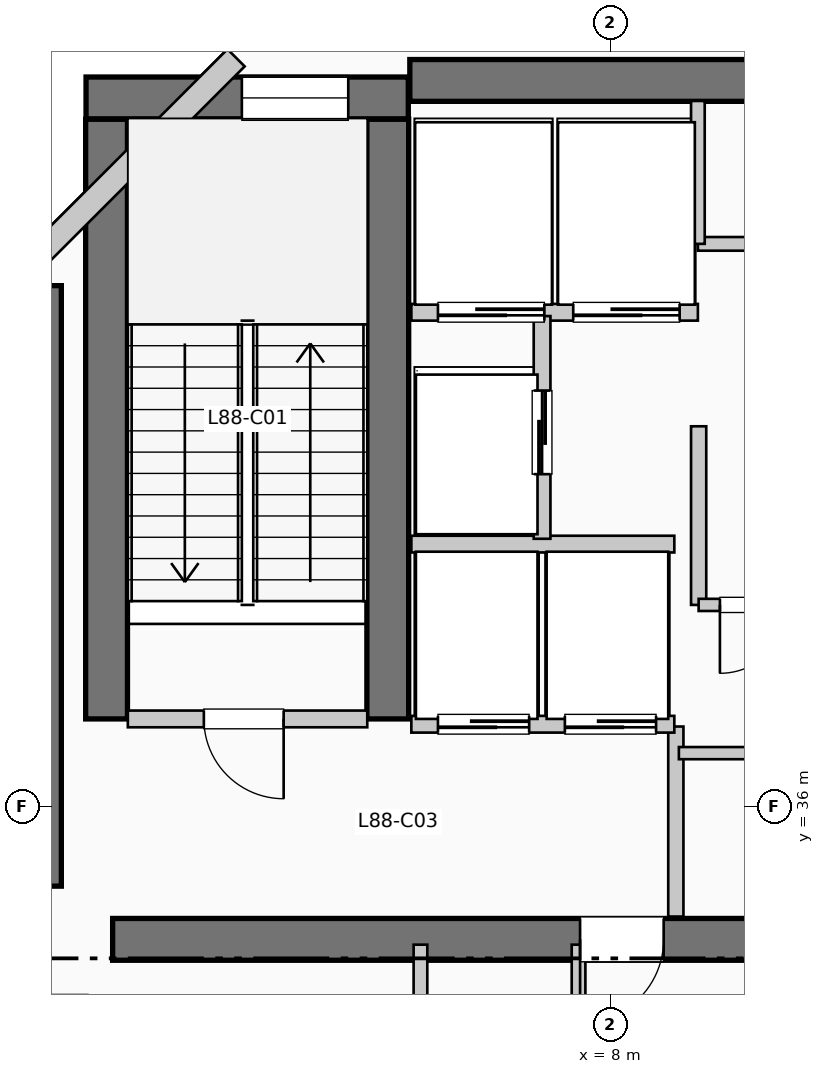
"""IFC4 building model, lengths in metres.
Left out: names, types, materials, properties, quantities, classifications, styles, units other than length and angle.
Written with IfcOpenShell. Run it as: python <this file> out.ifc"""

import sys

from ifc_helpers import new_model, si_unit, direction, frame, frame_2d, origin, place, context, subcontext, project, spatial, rectangle, extrude, element, fill, save


model = new_model("IFC4")
c1 = context("Model", 3, precision=1e-05, world=origin(), true_north=direction((0.0, 1.0)))
c2 = subcontext(c1, "Body", "Model", "MODEL_VIEW")
j1 = project(units=[si_unit("LENGTHUNIT", "METRE"), si_unit("PLANEANGLEUNIT", "RADIAN")], contexts=[c1])
p1 = place(None, origin())
s1 = spatial("IfcSite", under=j1, at=p1, CompositionType="ELEMENT")
p2 = place(p1, origin())
s2 = spatial("IfcBuilding", under=s1, at=p2, CompositionType="ELEMENT")
p3 = place(p2, frame((0.0, 0.0, 361.35)))
s3 = spatial("IfcBuildingStorey", under=s2, at=p3, CompositionType="ELEMENT", Elevation=361.35)
p4 = place(p3, frame((5.36, 45.55, 0.0), z_axis=(0.0, 0.0, 1.0), x_axis=(1.0, 0.0, 0.0)))
e1 = element("IfcWall", 1, at=p4, inside=s3, PredefinedType="SHEAR", context=c2, shape_type="SweptSolid", body=[
    extrude(rectangle(XDim=13.98, YDim=0.55, at=frame_2d((6.99, 0.0))), origin(), (0.0, 0.0, 1.0), 4.62),
])
p5 = place(p3, frame((0.5, 34.95, 0.0), z_axis=(0.0, 0.0, 1.0), x_axis=(0.0, 1.0, 0.0)))
e2 = element("IfcWall", 2, at=p5, inside=s3, PredefinedType="SHEAR", context=c2, shape_type="SweptSolid", body=[
    extrude(rectangle(XDim=7.9, YDim=0.55, at=frame_2d((3.95, 0.0))), origin(), (0.0, 0.0, 1.0), 4.62),
])
p6 = place(p3, frame((1.45, 34.25, 0.0), z_axis=(0.0, 0.0, 1.0), x_axis=(1.0, 0.0, 0.0)))
e3 = element("IfcWall", 3, at=p6, inside=s3, PredefinedType="SHEAR", context=c2, shape_type="SweptSolid", body=[
    extrude(rectangle(XDim=10.71, YDim=0.55, at=frame_2d((5.355, 0.0))), origin(), (0.0, 0.0, 1.0), 4.62),
])
p7 = place(p6, frame((7.25, 0.0, 0.0), z_axis=(0.0, 0.0, 1.0), x_axis=(-1.0, 0.0, 0.0)))
e4 = element("IfcOpeningElement", 4, at=p7, cuts=e3, PredefinedType="OPENING", context=c2, shape_type="SweptSolid", body=[
    extrude(rectangle(XDim=1.1, YDim=2.15, at=frame_2d((0.55, 1.075))), frame((0.0, 0.285, 0.0), z_axis=(0.0, -1.0, 0.0), x_axis=(1.0, 0.0, 0.0)), (0.0, 0.0, 1.0), 0.57),
])
for number, where, z_axis, x_axis in (
    (5, (1.37, 37.15, 0.0), (0.0, 0.0, 1.0), (0.0, 1.0, 0.0)),
    (6, (5.07, 37.15, 0.0), (0.0, 0.0, 1.0), (0.0, 1.0, 0.0)),
):
    element("IfcWall", number, at=place(p3, frame(where, z_axis=z_axis, x_axis=x_axis)), inside=s3, PredefinedType="SHEAR", context=c2, shape_type="SweptSolid", body=[
        extrude(rectangle(XDim=7.89, YDim=0.55, at=frame_2d((3.945, 0.0))), origin(), (0.0, 0.0, 1.0), 4.62),
    ])
p8 = place(p3, frame((1.1, 45.32, 0.0), z_axis=(0.0, 0.0, 1.0), x_axis=(1.0, 0.0, 0.0)))
e7 = element("IfcWall", 7, at=p8, inside=s3, PredefinedType="SHEAR", context=c2, shape_type="SweptSolid", body=[
    extrude(rectangle(XDim=4.24, YDim=0.55, at=frame_2d((2.12, 0.0))), origin(), (0.0, 0.0, 1.0), 4.62),
])
p9 = place(p8, frame((2.05, 0.0, 1.05)))
e8 = element("IfcOpeningElement", 8, at=p9, cuts=e7, PredefinedType="OPENING", context=c2, shape_type="SweptSolid", body=[
    extrude(rectangle(XDim=1.4, YDim=1.8, at=frame_2d((0.7, 0.9))), frame((0.0, 0.285, 0.0), z_axis=(0.0, -1.0, 0.0), x_axis=(1.0, 0.0, 0.0)), (0.0, 0.0, 1.0), 0.57),
])
p10 = place(p3, frame((3.074, 45.848, 0.0), z_axis=(0.0, 0.0, 1.0), x_axis=(-0.707106781187, -0.707106781187, 0.0)))
e9 = element("IfcWall", 9, at=p10, inside=s3, PredefinedType="SOLIDWALL", context=c2, shape_type="SweptSolid", body=[
    extrude(rectangle(XDim=4.133, YDim=0.32, at=frame_2d((2.066, 0.0))), origin(), (0.0, 0.0, 1.0), 4.27),
])
p11 = place(p3, frame((1.65, 37.15, 0.0), z_axis=(0.0, 0.0, 1.0), x_axis=(1.0, 0.0, 0.0)))
e10 = element("IfcWall", 10, at=p11, inside=s3, PredefinedType="PARTITIONING", context=c2, shape_type="SweptSolid", body=[
    extrude(rectangle(XDim=3.15, YDim=0.22, at=frame_2d((1.575, 0.0))), origin(), (0.0, 0.0, 1.0), 4.27),
])
p12 = place(p11, frame((2.05, 0.0, 0.0), z_axis=(0.0, 0.0, 1.0), x_axis=(-1.0, 0.0, 0.0)))
e11 = element("IfcOpeningElement", 11, at=p12, cuts=e10, PredefinedType="OPENING", context=c2, shape_type="SweptSolid", body=[
    extrude(rectangle(XDim=1.05, YDim=2.15, at=frame_2d((0.525, 1.075))), frame((0.0, 0.12, 0.0), z_axis=(0.0, -1.0, 0.0), x_axis=(1.0, 0.0, 0.0)), (0.0, 0.0, 1.0), 0.24),
])
p13 = place(p3, frame((8.86, 34.55, 0.0), z_axis=(0.0, 0.0, 1.0), x_axis=(0.0, 1.0, 0.0)))
e12 = element("IfcWall", 12, at=p13, inside=s3, PredefinedType="PARTITIONING", context=c2, shape_type="SweptSolid", body=[
    extrude(rectangle(XDim=2.5, YDim=0.2, at=frame_2d((1.25, 0.0))), origin(), (0.0, 0.0, 1.0), 4.27),
])
p14 = place(p3, frame((5.38, 37.08, 0.0), z_axis=(0.0, 0.0, 1.0), x_axis=(1.0, 0.0, 0.0)))
e13 = element("IfcWall", 13, at=p14, inside=s3, PredefinedType="PARTITIONING", context=c2, shape_type="SweptSolid", body=[
    extrude(rectangle(XDim=3.46, YDim=0.22, at=frame_2d((1.73, 0.0))), origin(), (0.0, 0.0, 1.0), 4.27),
])
p15 = place(p14, frame((1.55, 0.0, 0.0), z_axis=(0.0, 0.0, 1.0), x_axis=(-1.0, 0.0, 0.0)))
e14 = element("IfcOpeningElement", 14, at=p15, cuts=e13, PredefinedType="OPENING", context=c2, shape_type="SweptSolid", body=[
    extrude(rectangle(XDim=1.2, YDim=2.2, at=frame_2d((0.6, 1.1))), frame((0.0, 0.12, 0.0), z_axis=(0.0, -1.0, 0.0), x_axis=(1.0, 0.0, 0.0)), (0.0, 0.0, 1.0), 0.24),
])
p16 = place(p14, frame((3.22, 0.0, 0.0), z_axis=(0.0, 0.0, 1.0), x_axis=(-1.0, 0.0, 0.0)))
e15 = element("IfcOpeningElement", 15, at=p16, cuts=e13, PredefinedType="OPENING", context=c2, shape_type="SweptSolid", body=[
    extrude(rectangle(XDim=1.2, YDim=2.2, at=frame_2d((0.6, 1.1))), frame((0.0, 0.12, 0.0), z_axis=(0.0, -1.0, 0.0), x_axis=(1.0, 0.0, 0.0)), (0.0, 0.0, 1.0), 0.24),
])
p17 = place(p3, frame((5.38, 39.45, 0.0), z_axis=(0.0, 0.0, 1.0), x_axis=(1.0, 0.0, 0.0)))
e16 = element("IfcWall", 16, at=p17, inside=s3, PredefinedType="PARTITIONING", context=c2, shape_type="SweptSolid", body=[
    extrude(rectangle(XDim=3.46, YDim=0.22, at=frame_2d((1.73, 0.0))), origin(), (0.0, 0.0, 1.0), 4.27),
])
p18 = place(p3, frame((5.38, 42.5, 0.0), z_axis=(0.0, 0.0, 1.0), x_axis=(1.0, 0.0, 0.0)))
e17 = element("IfcWall", 17, at=p18, inside=s3, PredefinedType="PARTITIONING", context=c2, shape_type="SweptSolid", body=[
    extrude(rectangle(XDim=3.77, YDim=0.22, at=frame_2d((1.885, 0.0))), origin(), (0.0, 0.0, 1.0), 4.27),
])
p19 = place(p18, frame((1.75, 0.0, 0.0), z_axis=(0.0, 0.0, 1.0), x_axis=(-1.0, 0.0, 0.0)))
e18 = element("IfcOpeningElement", 18, at=p19, cuts=e17, PredefinedType="OPENING", context=c2, shape_type="SweptSolid", body=[
    extrude(rectangle(XDim=1.4, YDim=2.2, at=frame_2d((0.7, 1.1))), frame((0.0, 0.12, 0.0), z_axis=(0.0, -1.0, 0.0), x_axis=(1.0, 0.0, 0.0)), (0.0, 0.0, 1.0), 0.24),
])
p20 = place(p18, frame((3.53, 0.0, 0.0), z_axis=(0.0, 0.0, 1.0), x_axis=(-1.0, 0.0, 0.0)))
e19 = element("IfcOpeningElement", 19, at=p20, cuts=e17, PredefinedType="OPENING", context=c2, shape_type="SweptSolid", body=[
    extrude(rectangle(XDim=1.4, YDim=2.2, at=frame_2d((0.7, 1.1))), frame((0.0, 0.12, 0.0), z_axis=(0.0, -1.0, 0.0), x_axis=(1.0, 0.0, 0.0)), (0.0, 0.0, 1.0), 0.24),
])
p21 = place(p3, frame((7.1, 39.52, 0.0), z_axis=(0.0, 0.0, 1.0), x_axis=(0.0, 1.0, 0.0)))
e20 = element("IfcWall", 20, at=p21, inside=s3, PredefinedType="PARTITIONING", context=c2, shape_type="SweptSolid", body=[
    extrude(rectangle(XDim=2.93, YDim=0.22, at=frame_2d((1.465, 0.0))), origin(), (0.0, 0.0, 1.0), 4.27),
])
p22 = place(p21, frame((0.85, 0.0, 0.0)))
e21 = element("IfcOpeningElement", 21, at=p22, cuts=e20, PredefinedType="OPENING", context=c2, shape_type="SweptSolid", body=[
    extrude(rectangle(XDim=1.1, YDim=2.2, at=frame_2d((0.55, 1.1))), frame((0.0, 0.12, 0.0), z_axis=(0.0, -1.0, 0.0), x_axis=(1.0, 0.0, 0.0)), (0.0, 0.0, 1.0), 0.24),
])
p23 = place(p3, frame((9.16, 38.65, 0.0), z_axis=(0.0, 0.0, 1.0), x_axis=(0.0, 1.0, 0.0)))
e22 = element("IfcWall", 22, at=p23, inside=s3, PredefinedType="PARTITIONING", context=c2, shape_type="SweptSolid", body=[
    extrude(rectangle(XDim=2.35, YDim=0.2, at=frame_2d((1.175, 0.0))), origin(), (0.0, 0.0, 1.0), 4.27),
])
for number, where, z_axis, x_axis in (
    (23, (7.58, 31.82, 0.0), (0.0, 0.0, 1.0), (0.0, 1.0, 0.0)),
    (24, (5.5, 31.82, 0.0), (0.0, 0.0, 1.0), (0.0, 1.0, 0.0)),
):
    element("IfcWall", number, at=place(p3, frame(where, z_axis=z_axis, x_axis=x_axis)), inside=s3, PredefinedType="PLUMBINGWALL", context=c2, shape_type="SweptSolid", body=[
        extrude(rectangle(XDim=2.36, YDim=0.18, at=frame_2d((1.18, 0.0))), origin(), (0.0, 0.0, 1.0), 4.27),
    ])
p24 = place(p3, frame((8.9, 36.7, 0.0), z_axis=(0.0, 0.0, 1.0), x_axis=(1.0, 0.0, 0.0)))
e25 = element("IfcWall", 25, at=p24, inside=s3, PredefinedType="PARTITIONING", context=c2, shape_type="SweptSolid", body=[
    extrude(rectangle(XDim=3.25, YDim=0.16, at=frame_2d((1.625, 0.0))), origin(), (0.0, 0.0, 1.0), 4.27),
])
p25 = place(p24, frame((1.1, 0.0, 0.0)))
e26 = element("IfcOpeningElement", 26, at=p25, cuts=e25, PredefinedType="OPENING", context=c2, shape_type="SweptSolid", body=[
    extrude(rectangle(XDim=0.95, YDim=2.15, at=frame_2d((0.475, 1.075))), frame((0.0, 0.09, 0.0), z_axis=(0.0, -1.0, 0.0), x_axis=(1.0, 0.0, 0.0)), (0.0, 0.0, 1.0), 0.18),
])
p26 = place(p3, frame((9.16, 38.65, 0.0), z_axis=(0.0, 0.0, 1.0), x_axis=(1.0, 0.0, 0.0)))
e27 = element("IfcWall", 27, at=p26, inside=s3, PredefinedType="PARTITIONING", context=c2, shape_type="SweptSolid", body=[
    extrude(rectangle(XDim=3.42, YDim=0.16, at=frame_2d((1.71, 0.0))), origin(), (0.0, 0.0, 1.0), 4.27),
])
p27 = place(p26, frame((1.18, 0.0, 0.0), z_axis=(0.0, 0.0, 1.0), x_axis=(-1.0, 0.0, 0.0)))
e28 = element("IfcOpeningElement", 28, at=p27, cuts=e27, PredefinedType="OPENING", context=c2, shape_type="SweptSolid", body=[
    extrude(rectangle(XDim=0.9, YDim=2.15, at=frame_2d((0.45, 1.075))), frame((0.0, 0.09, 0.0), z_axis=(0.0, -1.0, 0.0), x_axis=(1.0, 0.0, 0.0)), (0.0, 0.0, 1.0), 0.18),
])
p28 = place(p26, frame((2.6, 0.0, 0.0), z_axis=(0.0, 0.0, 1.0), x_axis=(-1.0, 0.0, 0.0)))
e29 = element("IfcOpeningElement", 29, at=p28, cuts=e27, PredefinedType="OPENING", context=c2, shape_type="SweptSolid", body=[
    extrude(rectangle(XDim=0.9, YDim=2.15, at=frame_2d((0.45, 1.075))), frame((0.0, 0.09, 0.0), z_axis=(0.0, -1.0, 0.0), x_axis=(1.0, 0.0, 0.0)), (0.0, 0.0, 1.0), 0.18),
])
p29 = place(p3, frame((9.15, 43.4, 0.0), z_axis=(0.0, 0.0, 1.0), x_axis=(1.0, 0.0, 0.0)))
e30 = element("IfcWall", 30, at=p29, inside=s3, PredefinedType="PLUMBINGWALL", context=c2, shape_type="SweptSolid", body=[
    extrude(rectangle(XDim=9.33, YDim=0.18, at=frame_2d((4.665, 0.0))), origin(), (0.0, 0.0, 1.0), 4.27),
])
p30 = place(p29, frame((0.72, 0.0, 0.0)))
e31 = element("IfcOpeningElement", 31, at=p30, cuts=e30, PredefinedType="OPENING", context=c2, shape_type="SweptSolid", body=[
    extrude(rectangle(XDim=0.92, YDim=2.1, at=frame_2d((0.46, 1.05))), frame((0.0, 0.1, 0.0), z_axis=(0.0, -1.0, 0.0), x_axis=(1.0, 0.0, 0.0)), (0.0, 0.0, 1.0), 0.2),
])
p31 = place(p29, frame((3.02, 0.0, 0.0)))
e32 = element("IfcOpeningElement", 32, at=p31, cuts=e30, PredefinedType="OPENING", context=c2, shape_type="SweptSolid", body=[
    extrude(rectangle(XDim=0.92, YDim=2.1, at=frame_2d((0.46, 1.05))), frame((0.0, 0.1, 0.0), z_axis=(0.0, -1.0, 0.0), x_axis=(1.0, 0.0, 0.0)), (0.0, 0.0, 1.0), 0.2),
])
p32 = place(p29, frame((5.34, 0.0, 0.0)))
e33 = element("IfcOpeningElement", 33, at=p32, cuts=e30, PredefinedType="OPENING", context=c2, shape_type="SweptSolid", body=[
    extrude(rectangle(XDim=0.92, YDim=2.1, at=frame_2d((0.46, 1.05))), frame((0.0, 0.1, 0.0), z_axis=(0.0, -1.0, 0.0), x_axis=(1.0, 0.0, 0.0)), (0.0, 0.0, 1.0), 0.2),
])
p33 = place(p29, frame((7.66, 0.0, 0.0)))
e34 = element("IfcOpeningElement", 34, at=p33, cuts=e30, PredefinedType="OPENING", context=c2, shape_type="SweptSolid", body=[
    extrude(rectangle(XDim=0.95, YDim=2.1, at=frame_2d((0.475, 1.05))), frame((0.0, 0.1, 0.0), z_axis=(0.0, -1.0, 0.0), x_axis=(1.0, 0.0, 0.0)), (0.0, 0.0, 1.0), 0.2),
])
p34 = place(p3, frame((9.15, 43.4, 0.0), z_axis=(0.0, 0.0, 1.0), x_axis=(0.0, 1.0, 0.0)))
e35 = element("IfcWall", 35, at=p34, inside=s3, PredefinedType="PLUMBINGWALL", context=c2, shape_type="SweptSolid", body=[
    extrude(rectangle(XDim=1.88, YDim=0.18, at=frame_2d((0.94, 0.0))), origin(), (0.0, 0.0, 1.0), 4.27),
])
p35 = place(p9, origin())
e36 = element("IfcWindow", 36, at=p35, inside=s3, PartitioningType="SINGLE_PANEL", PredefinedType="WINDOW", context=c2, shape_type="SweptSolid", body=[
    extrude(rectangle(XDim=1.4, YDim=1.8, at=frame_2d((0.7, 0.9))), frame((0.0, 0.03, 0.0), z_axis=(0.0, -1.0, 0.0), x_axis=(1.0, 0.0, 0.0)), (0.0, 0.0, 1.0), 0.06),
])
fill(e8, e36)
p36 = place(p12, origin())
e37 = element("IfcDoor", 37, at=p36, inside=s3, OperationType="SINGLE_SWING_RIGHT", PredefinedType="DOOR", context=c2, shape_type="SweptSolid", body=[
    extrude(rectangle(XDim=1.05, YDim=2.15, at=frame_2d((0.525, 1.075))), frame((0.0, 0.025, 0.0), z_axis=(0.0, -1.0, 0.0), x_axis=(1.0, 0.0, 0.0)), (0.0, 0.0, 1.0), 0.05),
])
fill(e11, e37)
p37 = place(p7, origin())
e38 = element("IfcDoor", 38, at=p37, inside=s3, OperationType="SINGLE_SWING_LEFT", PredefinedType="DOOR", context=c2, shape_type="SweptSolid", body=[
    extrude(rectangle(XDim=1.1, YDim=2.15, at=frame_2d((0.55, 1.075))), frame((0.0, 0.025, 0.0), z_axis=(0.0, -1.0, 0.0), x_axis=(1.0, 0.0, 0.0)), (0.0, 0.0, 1.0), 0.05),
])
fill(e4, e38)
p38 = place(p15, origin())
e39 = element("IfcDoor", 39, at=p38, inside=s3, OperationType="SLIDING_TO_RIGHT", PredefinedType="DOOR", context=c2, shape_type="SweptSolid", body=[
    extrude(rectangle(XDim=1.2, YDim=2.2, at=frame_2d((0.6, 1.1))), frame((0.0, 0.025, 0.0), z_axis=(0.0, -1.0, 0.0), x_axis=(1.0, 0.0, 0.0)), (0.0, 0.0, 1.0), 0.05),
])
fill(e14, e39)
p39 = place(p16, origin())
e40 = element("IfcDoor", 40, at=p39, inside=s3, OperationType="SLIDING_TO_RIGHT", PredefinedType="DOOR", context=c2, shape_type="SweptSolid", body=[
    extrude(rectangle(XDim=1.2, YDim=2.2, at=frame_2d((0.6, 1.1))), frame((0.0, 0.025, 0.0), z_axis=(0.0, -1.0, 0.0), x_axis=(1.0, 0.0, 0.0)), (0.0, 0.0, 1.0), 0.05),
])
fill(e15, e40)
p40 = place(p19, origin())
e41 = element("IfcDoor", 41, at=p40, inside=s3, OperationType="SLIDING_TO_LEFT", PredefinedType="DOOR", context=c2, shape_type="SweptSolid", body=[
    extrude(rectangle(XDim=1.4, YDim=2.2, at=frame_2d((0.7, 1.1))), frame((0.0, 0.025, 0.0), z_axis=(0.0, -1.0, 0.0), x_axis=(1.0, 0.0, 0.0)), (0.0, 0.0, 1.0), 0.05),
])
fill(e18, e41)
p41 = place(p20, origin())
e42 = element("IfcDoor", 42, at=p41, inside=s3, OperationType="SLIDING_TO_LEFT", PredefinedType="DOOR", context=c2, shape_type="SweptSolid", body=[
    extrude(rectangle(XDim=1.4, YDim=2.2, at=frame_2d((0.7, 1.1))), frame((0.0, 0.025, 0.0), z_axis=(0.0, -1.0, 0.0), x_axis=(1.0, 0.0, 0.0)), (0.0, 0.0, 1.0), 0.05),
])
fill(e19, e42)
p42 = place(p22, origin())
e43 = element("IfcDoor", 43, at=p42, inside=s3, OperationType="SLIDING_TO_LEFT", PredefinedType="DOOR", context=c2, shape_type="SweptSolid", body=[
    extrude(rectangle(XDim=1.1, YDim=2.2, at=frame_2d((0.55, 1.1))), frame((0.0, 0.025, 0.0), z_axis=(0.0, -1.0, 0.0), x_axis=(1.0, 0.0, 0.0)), (0.0, 0.0, 1.0), 0.05),
])
fill(e21, e43)
p43 = place(p27, origin())
e44 = element("IfcDoor", 44, at=p43, inside=s3, OperationType="SINGLE_SWING_LEFT", PredefinedType="DOOR", context=c2, shape_type="SweptSolid", body=[
    extrude(rectangle(XDim=0.9, YDim=2.15, at=frame_2d((0.45, 1.075))), frame((0.0, 0.025, 0.0), z_axis=(0.0, -1.0, 0.0), x_axis=(1.0, 0.0, 0.0)), (0.0, 0.0, 1.0), 0.05),
])
fill(e28, e44)
save(model, sys.argv[1])
